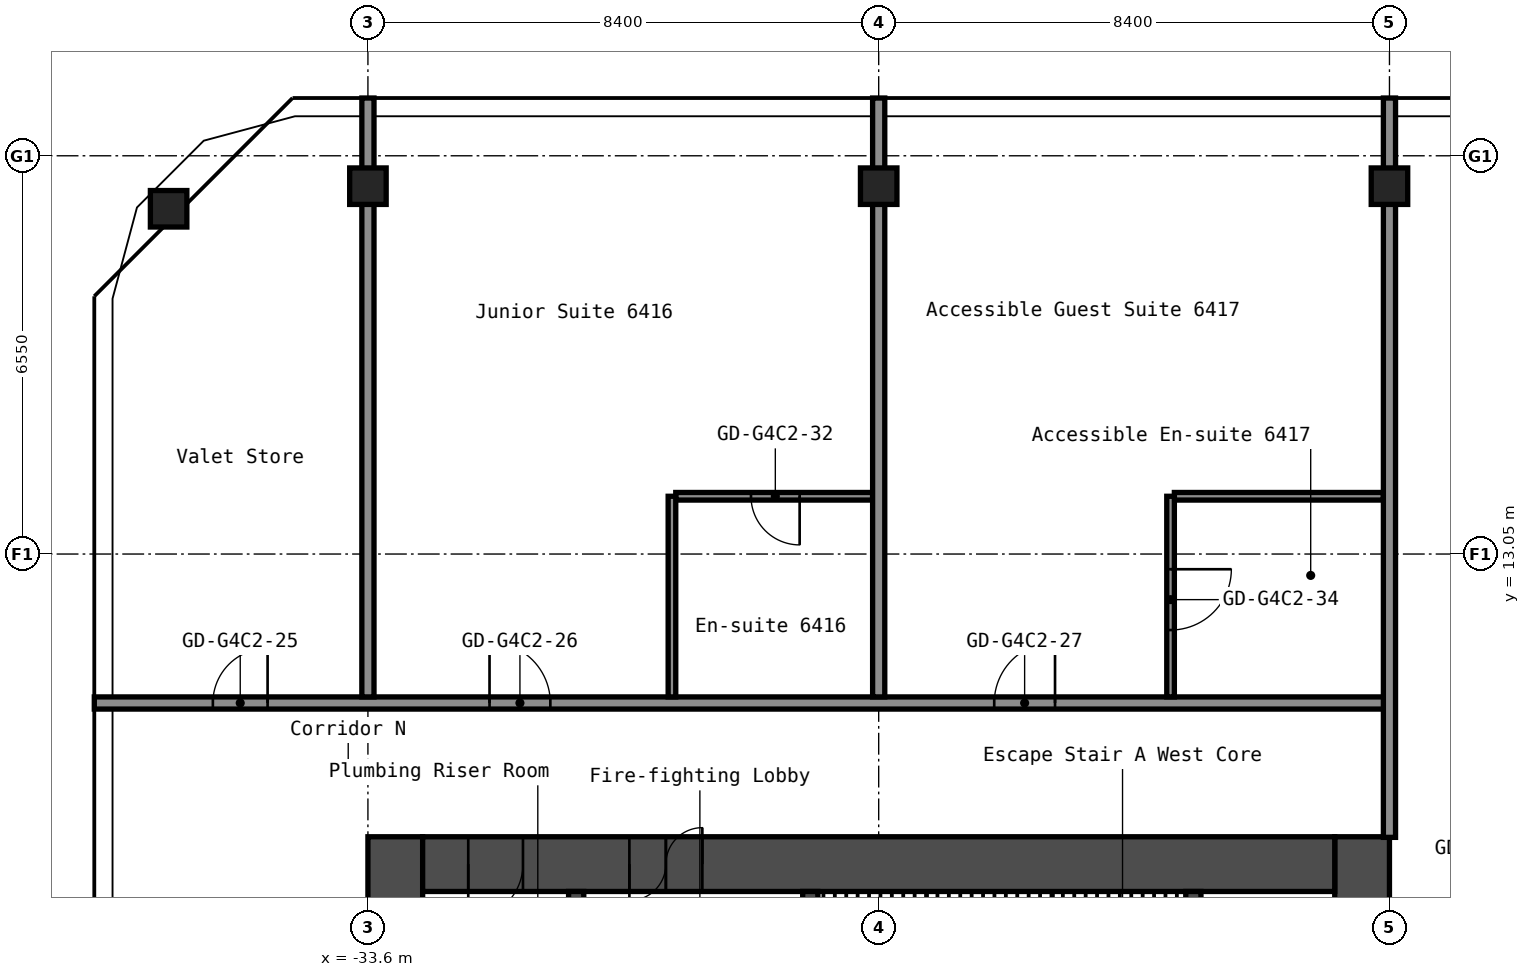
"""IFC4 building model, lengths in metres.
Left out: names, types, materials, properties, quantities, classifications, styles, units other than length and angle.
Written with IfcOpenShell. Run it as: python <this file> out.ifc"""

import sys

from ifc_helpers import new_model, si_unit, direction, frame, frame_2d, origin, origin_2d, place, context, subcontext, project, spatial, rectangle, hollow_rectangle, extrude, element, fill, save


model = new_model("IFC4")
c1 = context("Model", 3, precision=1e-05, world=origin(), true_north=direction((0.0, 1.0)))
c2 = subcontext(c1, "Body", "Model", "MODEL_VIEW")
j1 = project(units=[si_unit("LENGTHUNIT", "METRE"), si_unit("PLANEANGLEUNIT", "RADIAN")], contexts=[c1])
p1 = place(None, origin())
s1 = spatial("IfcSite", under=j1, at=p1, CompositionType="ELEMENT")
p2 = place(p1, origin())
s2 = spatial("IfcBuilding", under=s1, at=p2, CompositionType="ELEMENT")
p3 = place(p2, frame((0.0, 0.0, 225.0)))
s3 = spatial("IfcBuildingStorey", under=s2, at=p3, CompositionType="ELEMENT", Elevation=225.0)
for number, where, z_axis, x_axis in (
    (1, (-36.878, 18.729, 0.0), (0.0, 0.0, 1.0), (1.0, 0.0, 0.0)),
    (2, (-33.6, 19.1, 0.0), (0.0, 0.0, 1.0), (1.0, 0.0, 0.0)),
    (3, (-25.2, 19.1, 0.0), (0.0, 0.0, 1.0), (1.0, 0.0, 0.0)),
    (4, (-16.8, 19.1, 0.0), (0.0, 0.0, 1.0), (1.0, 0.0, 0.0)),
):
    element("IfcColumn", number, at=place(p3, frame(where, z_axis=z_axis, x_axis=x_axis)), inside=s3, PredefinedType="COLUMN", context=c2, shape_type="SweptSolid", body=[
        extrude(hollow_rectangle(XDim=0.6, YDim=0.6, WallThickness=0.025, InnerFilletRadius=0.038, OuterFilletRadius=0.062, at=origin_2d()), origin(), (0.0, 0.0, 1.0), 2.9),
    ])
p4 = place(p3, frame((-17.25, -8.4, 0.0), z_axis=(0.0, 0.0, 1.0), x_axis=(0.0, 1.0, 0.0)))
e5 = element("IfcWall", 5, at=p4, inside=s3, PredefinedType="SHEAR", context=c2, shape_type="SweptSolid", body=[
    extrude(rectangle(XDim=16.8, YDim=0.9, at=frame_2d((8.4, 0.0))), origin(), (0.0, 0.0, 1.0), 2.9),
])
p5 = place(p4, frame((10.1, 0.0, 0.0)))
e6 = element("IfcOpeningElement", 6, at=p5, cuts=e5, PredefinedType="OPENING", context=c2, shape_type="SweptSolid", body=[
    extrude(rectangle(XDim=1.6, YDim=2.1, at=frame_2d((0.8, 1.05))), frame((0.0, 0.46, 0.0), z_axis=(0.0, -1.0, 0.0), x_axis=(1.0, 0.0, 0.0)), (0.0, 0.0, 1.0), 0.92),
])
p6 = place(p3, frame((-33.15, -8.4, 0.0), z_axis=(0.0, 0.0, 1.0), x_axis=(0.0, 1.0, 0.0)))
e7 = element("IfcWall", 7, at=p6, inside=s3, PredefinedType="SHEAR", context=c2, shape_type="SweptSolid", body=[
    extrude(rectangle(XDim=16.8, YDim=0.9, at=frame_2d((8.4, 0.0))), origin(), (0.0, 0.0, 1.0), 2.9),
])
p7 = place(p3, frame((-32.7, 7.95, 0.0), z_axis=(0.0, 0.0, 1.0), x_axis=(1.0, 0.0, 0.0)))
e8 = element("IfcWall", 8, at=p7, inside=s3, PredefinedType="SHEAR", context=c2, shape_type="SweptSolid", body=[
    extrude(rectangle(XDim=15.0, YDim=0.9, at=frame_2d((7.5, 0.0))), origin(), (0.0, 0.0, 1.0), 2.9),
])
p8 = place(p7, frame((3.4, 0.0, 0.0)))
e9 = element("IfcOpeningElement", 9, at=p8, cuts=e8, PredefinedType="OPENING", context=c2, shape_type="SweptSolid", body=[
    extrude(rectangle(XDim=1.2, YDim=2.1, at=frame_2d((0.6, 1.05))), frame((0.0, 0.46, 0.0), z_axis=(0.0, -1.0, 0.0), x_axis=(1.0, 0.0, 0.0)), (0.0, 0.0, 1.0), 0.92),
])
p9 = place(p7, frame((0.75, 0.0, 0.0)))
e10 = element("IfcOpeningElement", 10, at=p9, cuts=e8, PredefinedType="OPENING", context=c2, shape_type="SweptSolid", body=[
    extrude(rectangle(XDim=0.9, YDim=2.1, at=frame_2d((0.45, 1.05))), frame((0.0, 0.46, 0.0), z_axis=(0.0, -1.0, 0.0), x_axis=(1.0, 0.0, 0.0)), (0.0, 0.0, 1.0), 0.92),
])
p10 = place(p3, frame((-20.025, 1.2, 0.0), z_axis=(0.0, 0.0, 1.0), x_axis=(0.0, 1.0, 0.0)))
e11 = element("IfcWall", 11, at=p10, inside=s3, PredefinedType="SHEAR", context=c2, shape_type="SweptSolid", body=[
    extrude(rectangle(XDim=6.3, YDim=0.25, at=frame_2d((3.15, 0.0))), origin(), (0.0, 0.0, 1.0), 2.9),
])
p11 = place(p3, frame((-26.325, 3.75, 0.0), z_axis=(0.0, 0.0, 1.0), x_axis=(0.0, 1.0, 0.0)))
e12 = element("IfcWall", 12, at=p11, inside=s3, PredefinedType="SHEAR", context=c2, shape_type="SweptSolid", body=[
    extrude(rectangle(XDim=3.75, YDim=0.25, at=frame_2d((1.875, 0.0))), origin(), (0.0, 0.0, 1.0), 2.9),
])
p12 = place(p11, frame((1.25, 0.0, 0.0)))
e13 = element("IfcOpeningElement", 13, at=p12, cuts=e12, PredefinedType="OPENING", context=c2, shape_type="SweptSolid", body=[
    extrude(rectangle(XDim=1.2, YDim=2.1, at=frame_2d((0.6, 1.05))), frame((0.0, 0.135, 0.0), z_axis=(0.0, -1.0, 0.0), x_axis=(1.0, 0.0, 0.0)), (0.0, 0.0, 1.0), 0.27),
])
p13 = place(p3, frame((-30.175, 1.45, 0.0), z_axis=(0.0, 0.0, 1.0), x_axis=(0.0, 1.0, 0.0)))
e14 = element("IfcWall", 14, at=p13, inside=s3, PredefinedType="SHEAR", context=c2, shape_type="SweptSolid", body=[
    extrude(rectangle(XDim=6.05, YDim=0.25, at=frame_2d((3.025, 0.0))), origin(), (0.0, 0.0, 1.0), 2.9),
])
p14 = place(p13, frame((2.625, 0.0, 0.0)))
e15 = element("IfcOpeningElement", 15, at=p14, cuts=e14, PredefinedType="OPENING", context=c2, shape_type="SweptSolid", body=[
    extrude(rectangle(XDim=1.1, YDim=2.1, at=frame_2d((0.55, 1.05))), frame((0.0, 0.135, 0.0), z_axis=(0.0, -1.0, 0.0), x_axis=(1.0, 0.0, 0.0)), (0.0, 0.0, 1.0), 0.27),
])
p15 = place(p3, frame((-38.1, 10.6, 0.0), z_axis=(0.0, 0.0, 1.0), x_axis=(1.0, 0.0, 0.0)))
e16 = element("IfcWall", 16, at=p15, inside=s3, PredefinedType="PARTITIONING", context=c2, shape_type="SweptSolid", body=[
    extrude(rectangle(XDim=21.3, YDim=0.2, at=frame_2d((10.65, 0.0))), origin(), (0.0, 0.0, 1.0), 2.9),
])
p16 = place(p15, frame((1.95, 0.0, 0.0)))
e17 = element("IfcOpeningElement", 17, at=p16, cuts=e16, PredefinedType="OPENING", context=c2, shape_type="SweptSolid", body=[
    extrude(rectangle(XDim=0.9, YDim=2.1, at=frame_2d((0.45, 1.05))), frame((0.0, 0.11, 0.0), z_axis=(0.0, -1.0, 0.0), x_axis=(1.0, 0.0, 0.0)), (0.0, 0.0, 1.0), 0.22),
])
p17 = place(p15, frame((6.5, 0.0, 0.0)))
e18 = element("IfcOpeningElement", 18, at=p17, cuts=e16, PredefinedType="OPENING", context=c2, shape_type="SweptSolid", body=[
    extrude(rectangle(XDim=1.0, YDim=2.1, at=frame_2d((0.5, 1.05))), frame((0.0, 0.11, 0.0), z_axis=(0.0, -1.0, 0.0), x_axis=(1.0, 0.0, 0.0)), (0.0, 0.0, 1.0), 0.22),
])
p18 = place(p15, frame((14.8, 0.0, 0.0)))
e19 = element("IfcOpeningElement", 19, at=p18, cuts=e16, PredefinedType="OPENING", context=c2, shape_type="SweptSolid", body=[
    extrude(rectangle(XDim=1.0, YDim=2.1, at=frame_2d((0.5, 1.05))), frame((0.0, 0.11, 0.0), z_axis=(0.0, -1.0, 0.0), x_axis=(1.0, 0.0, 0.0)), (0.0, 0.0, 1.0), 0.22),
])
p19 = place(p3, frame((-28.538, 14.0, 0.0), z_axis=(0.0, 0.0, 1.0), x_axis=(1.0, 0.0, 0.0)))
e20 = element("IfcWall", 20, at=p19, inside=s3, PredefinedType="PARTITIONING", context=c2, shape_type="SweptSolid", body=[
    extrude(rectangle(XDim=3.238, YDim=0.125, at=frame_2d((1.619, 0.0))), origin(), (0.0, 0.0, 1.0), 2.9),
])
p20 = place(p19, frame((1.238, 0.0, 0.0)))
e21 = element("IfcOpeningElement", 21, at=p20, cuts=e20, PredefinedType="OPENING", context=c2, shape_type="SweptSolid", body=[
    extrude(rectangle(XDim=0.8, YDim=2.1, at=frame_2d((0.4, 1.05))), frame((0.0, 0.073, 0.0), z_axis=(0.0, -1.0, 0.0), x_axis=(1.0, 0.0, 0.0)), (0.0, 0.0, 1.0), 0.145),
])
p21 = place(p3, frame((-20.337, 14.0, 0.0), z_axis=(0.0, 0.0, 1.0), x_axis=(1.0, 0.0, 0.0)))
e22 = element("IfcWall", 22, at=p21, inside=s3, PredefinedType="PARTITIONING", context=c2, shape_type="SweptSolid", body=[
    extrude(rectangle(XDim=3.438, YDim=0.125, at=frame_2d((1.719, 0.0))), origin(), (0.0, 0.0, 1.0), 2.9),
])
p22 = place(p3, frame((-33.6, 10.7, 0.0), z_axis=(0.0, 0.0, 1.0), x_axis=(0.0, 1.0, 0.0)))
e23 = element("IfcWall", 23, at=p22, inside=s3, PredefinedType="PARTITIONING", context=c2, shape_type="SweptSolid", body=[
    extrude(rectangle(XDim=9.85, YDim=0.2, at=frame_2d((4.925, 0.0))), origin(), (0.0, 0.0, 1.0), 2.9),
])
p23 = place(p3, frame((-28.6, 10.7, 0.0), z_axis=(0.0, 0.0, 1.0), x_axis=(0.0, 1.0, 0.0)))
e24 = element("IfcWall", 24, at=p23, inside=s3, PredefinedType="PARTITIONING", context=c2, shape_type="SweptSolid", body=[
    extrude(rectangle(XDim=3.3, YDim=0.125, at=frame_2d((1.65, 0.0))), origin(), (0.0, 0.0, 1.0), 2.9),
])
p24 = place(p3, frame((-25.2, 10.7, 0.0), z_axis=(0.0, 0.0, 1.0), x_axis=(0.0, 1.0, 0.0)))
e25 = element("IfcWall", 25, at=p24, inside=s3, PredefinedType="PARTITIONING", context=c2, shape_type="SweptSolid", body=[
    extrude(rectangle(XDim=9.85, YDim=0.2, at=frame_2d((4.925, 0.0))), origin(), (0.0, 0.0, 1.0), 2.9),
])
p25 = place(p3, frame((-20.4, 10.7, 0.0), z_axis=(0.0, 0.0, 1.0), x_axis=(0.0, 1.0, 0.0)))
e26 = element("IfcWall", 26, at=p25, inside=s3, PredefinedType="PARTITIONING", context=c2, shape_type="SweptSolid", body=[
    extrude(rectangle(XDim=3.3, YDim=0.125, at=frame_2d((1.65, 0.0))), origin(), (0.0, 0.0, 1.0), 2.9),
])
p26 = place(p25, frame((1.1, 0.0, 0.0)))
e27 = element("IfcOpeningElement", 27, at=p26, cuts=e26, PredefinedType="OPENING", context=c2, shape_type="SweptSolid", body=[
    extrude(rectangle(XDim=1.0, YDim=2.1, at=frame_2d((0.5, 1.05))), frame((0.0, 0.073, 0.0), z_axis=(0.0, -1.0, 0.0), x_axis=(1.0, 0.0, 0.0)), (0.0, 0.0, 1.0), 0.145),
])
p27 = place(p3, frame((-16.8, 8.39, 0.0), z_axis=(0.0, 0.0, 1.0), x_axis=(0.0, 1.0, 0.0)))
e28 = element("IfcWall", 28, at=p27, inside=s3, PredefinedType="PARTITIONING", context=c2, shape_type="SweptSolid", body=[
    extrude(rectangle(XDim=12.16, YDim=0.2, at=frame_2d((6.08, 0.0))), origin(), (0.0, 0.0, 1.0), 2.9),
])
p28 = place(p8, origin())
e29 = element("IfcDoor", 29, at=p28, inside=s3, OperationType="DOUBLE_DOOR_SINGLE_SWING", PredefinedType="DOOR", context=c2, shape_type="SweptSolid", body=[
    extrude(rectangle(XDim=1.2, YDim=2.1, at=frame_2d((0.6, 1.05))), frame((0.0, 0.025, 0.0), z_axis=(0.0, -1.0, 0.0), x_axis=(1.0, 0.0, 0.0)), (0.0, 0.0, 1.0), 0.05),
])
fill(e9, e29)
p29 = place(p9, origin())
e30 = element("IfcDoor", 30, at=p29, inside=s3, OperationType="SINGLE_SWING_LEFT", PredefinedType="DOOR", context=c2, shape_type="SweptSolid", body=[
    extrude(rectangle(XDim=0.9, YDim=2.1, at=frame_2d((0.45, 1.05))), frame((0.0, 0.025, 0.0), z_axis=(0.0, -1.0, 0.0), x_axis=(1.0, 0.0, 0.0)), (0.0, 0.0, 1.0), 0.05),
])
fill(e10, e30)
p30 = place(p16, origin())
e31 = element("IfcDoor", 31, at=p30, inside=s3, OperationType="SINGLE_SWING_LEFT", PredefinedType="DOOR", context=c2, shape_type="SweptSolid", body=[
    extrude(rectangle(XDim=0.9, YDim=2.1, at=frame_2d((0.45, 1.05))), frame((0.0, 0.025, 0.0), z_axis=(0.0, -1.0, 0.0), x_axis=(1.0, 0.0, 0.0)), (0.0, 0.0, 1.0), 0.05),
])
fill(e17, e31)
p31 = place(p17, origin())
e32 = element("IfcDoor", 32, at=p31, inside=s3, OperationType="SINGLE_SWING_RIGHT", PredefinedType="DOOR", context=c2, shape_type="SweptSolid", body=[
    extrude(rectangle(XDim=1.0, YDim=2.1, at=frame_2d((0.5, 1.05))), frame((0.0, 0.025, 0.0), z_axis=(0.0, -1.0, 0.0), x_axis=(1.0, 0.0, 0.0)), (0.0, 0.0, 1.0), 0.05),
])
fill(e18, e32)
p32 = place(p18, origin())
e33 = element("IfcDoor", 33, at=p32, inside=s3, OperationType="SINGLE_SWING_LEFT", PredefinedType="DOOR", context=c2, shape_type="SweptSolid", body=[
    extrude(rectangle(XDim=1.0, YDim=2.1, at=frame_2d((0.5, 1.05))), frame((0.0, 0.025, 0.0), z_axis=(0.0, -1.0, 0.0), x_axis=(1.0, 0.0, 0.0)), (0.0, 0.0, 1.0), 0.05),
])
fill(e19, e33)
p33 = place(p20, origin())
e34 = element("IfcDoor", 34, at=p33, inside=s3, OperationType="SINGLE_SWING_RIGHT", PredefinedType="DOOR", context=c2, shape_type="SweptSolid", body=[
    extrude(rectangle(XDim=0.8, YDim=2.1, at=frame_2d((0.4, 1.05))), frame((0.0, 0.025, 0.0), z_axis=(0.0, -1.0, 0.0), x_axis=(1.0, 0.0, 0.0)), (0.0, 0.0, 1.0), 0.05),
])
fill(e21, e34)
p34 = place(p26, origin())
e35 = element("IfcDoor", 35, at=p34, inside=s3, OperationType="SINGLE_SWING_RIGHT", PredefinedType="DOOR", context=c2, shape_type="SweptSolid", body=[
    extrude(rectangle(XDim=1.0, YDim=2.1, at=frame_2d((0.5, 1.05))), frame((0.0, 0.025, 0.0), z_axis=(0.0, -1.0, 0.0), x_axis=(1.0, 0.0, 0.0)), (0.0, 0.0, 1.0), 0.05),
])
fill(e27, e35)
save(model, sys.argv[1])
